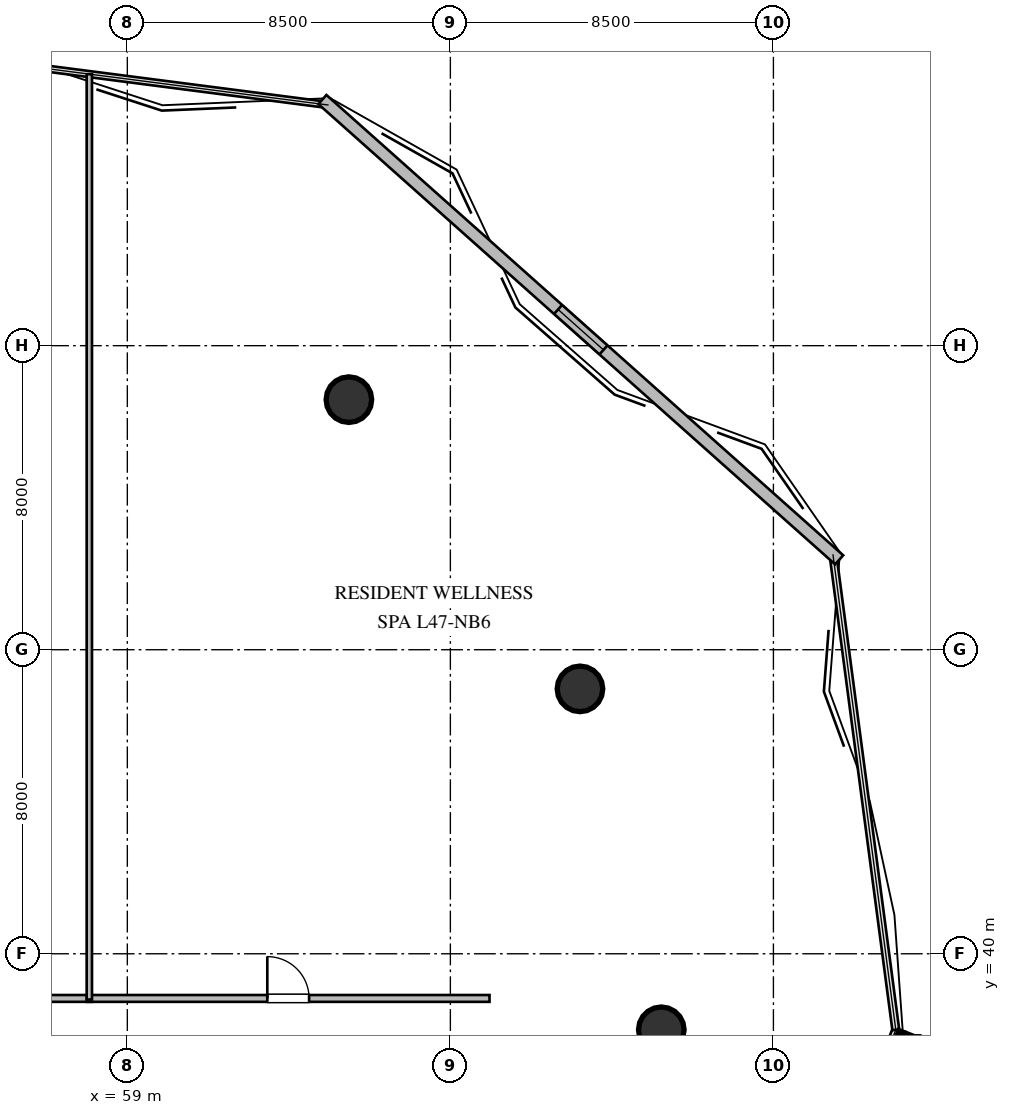
"""IFC4 building model, lengths in metres.
Left out: names, types, materials, properties, quantities, classifications, styles, units other than length and angle.
Written with IfcOpenShell. Run it as: python <this file> out.ifc"""

import sys

from ifc_helpers import new_model, si_unit, direction, frame, frame_2d, origin, origin_2d, place, context, subcontext, project, spatial, rectangle, circle, extrude, element, fill, save


model = new_model("IFC4")
c1 = context("Model", 3, precision=1e-05, world=origin(), true_north=direction((0.0, 1.0)))
c2 = subcontext(c1, "Body", "Model", "MODEL_VIEW")
j1 = project(units=[si_unit("LENGTHUNIT", "METRE"), si_unit("PLANEANGLEUNIT", "RADIAN")], contexts=[c1])
p1 = place(None, origin())
s1 = spatial("IfcSite", under=j1, at=p1, CompositionType="ELEMENT")
p2 = place(p1, origin())
s2 = spatial("IfcBuilding", under=s1, at=p2, CompositionType="ELEMENT")
p3 = place(p2, frame((0.0, 0.0, 178.2)))
s3 = spatial("IfcBuildingStorey", under=s2, at=p3, CompositionType="ELEMENT", Elevation=178.2)
for number, where, z_axis, x_axis in (
    (1, (73.05, 38.0, 0.0), (0.0, 0.0, 1.0), (1.0, 0.0, 0.0)),
    (2, (70.91, 46.97, 0.0), (0.0, 0.0, 1.0), (1.0, 0.0, 0.0)),
    (3, (64.83, 54.58, 0.0), (0.0, 0.0, 1.0), (1.0, 0.0, 0.0)),
):
    element("IfcColumn", number, at=place(p3, frame(where, z_axis=z_axis, x_axis=x_axis)), inside=s3, PredefinedType="COLUMN", context=c2, shape_type="SweptSolid", body=[
        extrude(circle(Radius=0.6, at=origin_2d()), origin(), (0.0, 0.0, 1.0), 3.6),
    ])
p4 = place(p3, frame((64.132, 62.477, 0.0), z_axis=(0.0, 0.0, 1.0), x_axis=(0.746726187299, -0.665131566836, 0.0)))
e4 = element("IfcWall", 4, at=p4, inside=s3, PredefinedType="STANDARD", context=c2, shape_type="SweptSolid", body=[
    extrude(rectangle(XDim=18.21, YDim=0.32, at=frame_2d((9.105, 0.0))), origin(), (0.0, 0.0, 1.0), 3.28),
])
p5 = place(p4, frame((8.305, 0.0, 1.05)))
e5 = element("IfcOpeningElement", 5, at=p5, cuts=e4, PredefinedType="OPENING", context=c2, shape_type="SweptSolid", body=[
    extrude(rectangle(XDim=1.6, YDim=1.5, at=frame_2d((0.8, 0.75))), frame((0.0, 0.17, 0.0), z_axis=(0.0, -1.0, 0.0), x_axis=(1.0, 0.0, 0.0)), (0.0, 0.0, 1.0), 0.34),
])
p6 = place(p3, frame((53.185, 38.825, 0.0), z_axis=(0.0, 0.0, 1.0), x_axis=(1.0, 0.0, 0.0)))
e6 = element("IfcWall", 6, at=p6, inside=s3, PredefinedType="PARTITIONING", context=c2, shape_type="SweptSolid", body=[
    extrude(rectangle(XDim=4.88, YDim=0.18, at=frame_2d((2.44, 0.0))), origin(), (0.0, 0.0, 1.0), 3.28),
])
p7 = place(p6, frame((1.89, 0.0, 0.0)))
e7 = element("IfcOpeningElement", 7, at=p7, cuts=e6, PredefinedType="OPENING", context=c2, shape_type="SweptSolid", body=[
    extrude(rectangle(XDim=1.1, YDim=2.1, at=frame_2d((0.55, 1.05))), frame((0.0, 0.1, 0.0), z_axis=(0.0, -1.0, 0.0), x_axis=(1.0, 0.0, 0.0)), (0.0, 0.0, 1.0), 0.2),
])
p8 = place(p3, frame((57.935, 38.825, 0.0), z_axis=(0.0, 0.0, 1.0), x_axis=(1.0, 0.0, 0.0)))
e8 = element("IfcWall", 8, at=p8, inside=s3, PredefinedType="PARTITIONING", context=c2, shape_type="SweptSolid", body=[
    extrude(rectangle(XDim=10.595, YDim=0.18, at=frame_2d((5.297, 0.0))), origin(), (0.0, 0.0, 1.0), 3.28),
])
p9 = place(p8, frame((4.748, 0.0, 0.0)))
e9 = element("IfcOpeningElement", 9, at=p9, cuts=e8, PredefinedType="OPENING", context=c2, shape_type="SweptSolid", body=[
    extrude(rectangle(XDim=1.1, YDim=2.1, at=frame_2d((0.55, 1.05))), frame((0.0, 0.1, 0.0), z_axis=(0.0, -1.0, 0.0), x_axis=(1.0, 0.0, 0.0)), (0.0, 0.0, 1.0), 0.2),
])
p10 = place(p3, frame((58.0, 63.143, 0.0), z_axis=(0.0, 0.0, 1.0), x_axis=(0.0, -1.0, 0.0)))
e10 = element("IfcWall", 10, at=p10, inside=s3, PredefinedType="PARTITIONING", context=c2, shape_type="SweptSolid", body=[
    extrude(rectangle(XDim=24.348, YDim=0.14, at=frame_2d((12.174, 0.0))), origin(), (0.0, 0.0, 1.0), 3.28),
])
p11 = place(p5, origin())
e11 = element("IfcWindow", 11, at=p11, inside=s3, PartitioningType="SINGLE_PANEL", PredefinedType="WINDOW", context=c2, shape_type="SweptSolid", body=[
    extrude(rectangle(XDim=1.6, YDim=1.5, at=frame_2d((0.8, 0.75))), frame((0.0, 0.03, 0.0), z_axis=(0.0, -1.0, 0.0), x_axis=(1.0, 0.0, 0.0)), (0.0, 0.0, 1.0), 0.06),
])
fill(e5, e11)
p12 = place(p9, origin())
e12 = element("IfcDoor", 12, at=p12, inside=s3, OperationType="SINGLE_SWING_LEFT", PredefinedType="DOOR", context=c2, shape_type="SweptSolid", body=[
    extrude(rectangle(XDim=1.1, YDim=2.1, at=frame_2d((0.55, 1.05))), frame((0.0, 0.025, 0.0), z_axis=(0.0, -1.0, 0.0), x_axis=(1.0, 0.0, 0.0)), (0.0, 0.0, 1.0), 0.05),
])
fill(e9, e12)
save(model, sys.argv[1])
